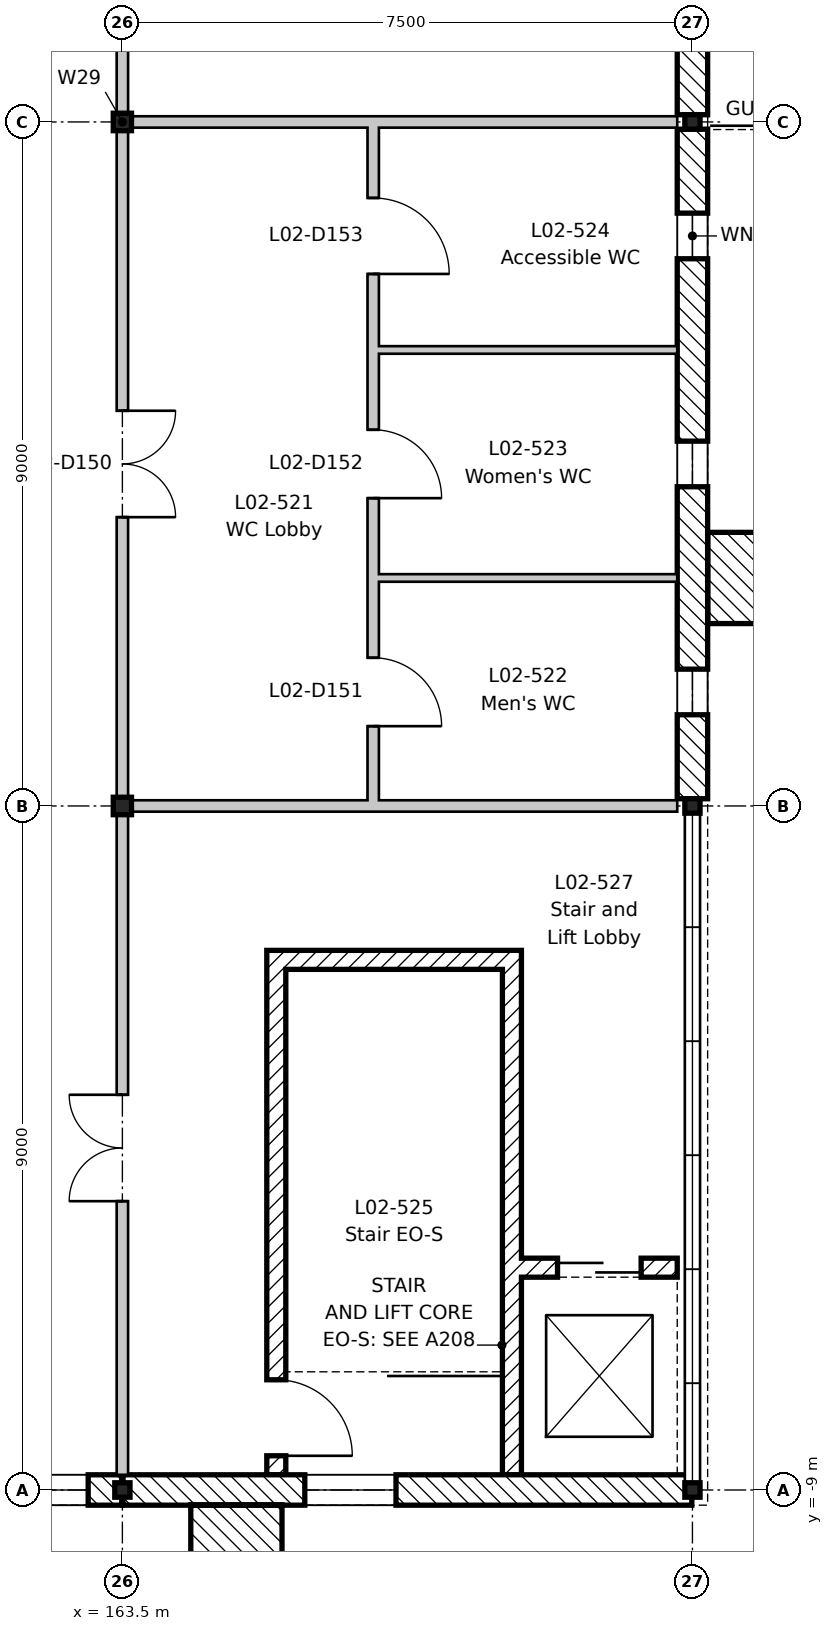
"""IFC4 building model, lengths in metres.
Left out: names, types, materials, properties, quantities, classifications, styles, units other than length and angle.
Written with IfcOpenShell. Run it as: python <this file> out.ifc"""

import sys

from ifc_helpers import new_model, si_unit, direction, frame, frame_2d, origin, origin_2d, place, context, subcontext, project, spatial, rectangle, i_section, extrude, element, fill, save


model = new_model("IFC4")
c1 = context("Model", 3, precision=1e-05, world=origin(), true_north=direction((0.0, 1.0)))
c2 = subcontext(c1, "Body", "Model", "MODEL_VIEW")
j1 = project(units=[si_unit("LENGTHUNIT", "METRE"), si_unit("PLANEANGLEUNIT", "RADIAN")], contexts=[c1])
p1 = place(None, origin())
s1 = spatial("IfcSite", under=j1, at=p1, CompositionType="ELEMENT")
p2 = place(p1, origin())
s2 = spatial("IfcBuilding", under=s1, at=p2, CompositionType="ELEMENT")
p3 = place(p2, frame((0.0, 0.0, 9.9)))
s3 = spatial("IfcBuildingStorey", under=s2, at=p3, CompositionType="ELEMENT", Elevation=9.9)
p4 = place(p3, frame((163.5, -9.0, -0.2), z_axis=(0.0, 0.0, 1.0), x_axis=(1.0, 0.0, 0.0)))
e1 = element("IfcColumn", 1, at=p4, inside=s3, PredefinedType="COLUMN", context=c2, shape_type="SweptSolid", body=[
    extrude(i_section(OverallWidth=0.2, OverallDepth=0.19, WebThickness=0.007, FlangeThickness=0.01, FilletRadius=0.018, at=origin_2d()), origin(), (0.0, 0.0, 1.0), 4.45),
])
for number, where, z_axis, x_axis in (
    (2, (163.5, 0.0, -0.2), (0.0, 0.0, 1.0), (1.0, 0.0, 0.0)),
    (3, (163.5, 9.0, -0.2), (0.0, 0.0, 1.0), (1.0, 0.0, 0.0)),
):
    element("IfcColumn", number, at=place(p3, frame(where, z_axis=z_axis, x_axis=x_axis)), inside=s3, PredefinedType="COLUMN", context=c2, shape_type="SweptSolid", body=[
        extrude(i_section(OverallWidth=0.24, OverallDepth=0.23, WebThickness=0.008, FlangeThickness=0.012, FilletRadius=0.021, at=origin_2d()), origin(), (0.0, 0.0, 1.0), 4.45),
    ])
for number, where, z_axis, x_axis in (
    (4, (171.0, -9.0, -0.2), (0.0, 0.0, 1.0), (1.0, 0.0, 0.0)),
    (5, (171.0, 0.0, -0.2), (0.0, 0.0, 1.0), (1.0, 0.0, 0.0)),
    (6, (171.0, 9.0, -0.2), (0.0, 0.0, 1.0), (1.0, 0.0, 0.0)),
):
    element("IfcColumn", number, at=place(p3, frame(where, z_axis=z_axis, x_axis=x_axis)), inside=s3, PredefinedType="COLUMN", context=c2, shape_type="SweptSolid", body=[
        extrude(i_section(OverallWidth=0.2, OverallDepth=0.19, WebThickness=0.007, FlangeThickness=0.01, FilletRadius=0.018, at=origin_2d()), origin(), (0.0, 0.0, 1.0), 4.45),
    ])
p5 = place(p3, frame((168.625, -8.8, 0.0), z_axis=(0.0, 0.0, 1.0), x_axis=(0.0, 1.0, 0.0)))
e7 = element("IfcWall", 7, at=p5, inside=s3, PredefinedType="SHEAR", context=c2, shape_type="SweptSolid", body=[
    extrude(rectangle(XDim=6.9, YDim=0.25, at=frame_2d((3.45, 0.0))), origin(), (0.0, 0.0, 1.0), 4.25),
])
p6 = place(p3, frame((165.525, -8.8, 0.0), z_axis=(0.0, 0.0, 1.0), x_axis=(0.0, 1.0, 0.0)))
e8 = element("IfcWall", 8, at=p6, inside=s3, PredefinedType="SHEAR", context=c2, shape_type="SweptSolid", body=[
    extrude(rectangle(XDim=6.9, YDim=0.25, at=frame_2d((3.45, 0.0))), origin(), (0.0, 0.0, 1.0), 4.25),
])
p7 = place(p6, frame((0.25, 0.0, 0.0)))
e9 = element("IfcOpeningElement", 9, at=p7, cuts=e8, PredefinedType="OPENING", context=c2, shape_type="SweptSolid", body=[
    extrude(rectangle(XDim=1.0, YDim=2.1, at=frame_2d((0.5, 1.05))), frame((0.0, 0.135, 0.0), z_axis=(0.0, -1.0, 0.0), x_axis=(1.0, 0.0, 0.0)), (0.0, 0.0, 1.0), 0.27),
])
p8 = place(p3, frame((165.65, -2.025, 0.0), z_axis=(0.0, 0.0, 1.0), x_axis=(1.0, 0.0, 0.0)))
e10 = element("IfcWall", 10, at=p8, inside=s3, PredefinedType="SHEAR", context=c2, shape_type="SweptSolid", body=[
    extrude(rectangle(XDim=2.85, YDim=0.25, at=frame_2d((1.425, 0.0))), origin(), (0.0, 0.0, 1.0), 4.25),
])
p9 = place(p3, frame((168.75, -6.075, 0.0), z_axis=(0.0, 0.0, 1.0), x_axis=(1.0, 0.0, 0.0)))
e11 = element("IfcWall", 11, at=p9, inside=s3, PredefinedType="SHEAR", context=c2, shape_type="SweptSolid", body=[
    extrude(rectangle(XDim=2.05, YDim=0.25, at=frame_2d((1.025, 0.0))), origin(), (0.0, 0.0, 1.0), 4.25),
])
p10 = place(p9, frame((0.475, 0.0, 0.0)))
e12 = element("IfcOpeningElement", 12, at=p10, cuts=e11, PredefinedType="OPENING", context=c2, shape_type="SweptSolid", body=[
    extrude(rectangle(XDim=1.1, YDim=2.1, at=frame_2d((0.55, 1.05))), frame((0.0, 0.135, 0.0), z_axis=(0.0, -1.0, 0.0), x_axis=(1.0, 0.0, 0.0)), (0.0, 0.0, 1.0), 0.27),
])
p11 = place(p3, frame((171.0, 8.905, 0.0), z_axis=(0.0, 0.0, 1.0), x_axis=(0.0, -1.0, 0.0)))
e13 = element("IfcWall", 13, at=p11, inside=s3, PredefinedType="STANDARD", context=c2, shape_type="SweptSolid", body=[
    extrude(rectangle(XDim=8.81, YDim=0.4, at=frame_2d((4.405, 0.0))), origin(), (0.0, 0.0, 1.0), 3.85),
])
p12 = place(p11, frame((7.105, 0.0, 1.5)))
e14 = element("IfcOpeningElement", 14, at=p12, cuts=e13, PredefinedType="OPENING", context=c2, shape_type="SweptSolid", body=[
    extrude(rectangle(XDim=0.6, YDim=1.2, at=frame_2d((0.3, 0.6))), frame((0.0, 0.21, 0.0), z_axis=(0.0, -1.0, 0.0), x_axis=(1.0, 0.0, 0.0)), (0.0, 0.0, 1.0), 0.42),
])
p13 = place(p11, frame((4.105, 0.0, 1.5)))
e15 = element("IfcOpeningElement", 15, at=p13, cuts=e13, PredefinedType="OPENING", context=c2, shape_type="SweptSolid", body=[
    extrude(rectangle(XDim=0.6, YDim=1.2, at=frame_2d((0.3, 0.6))), frame((0.0, 0.21, 0.0), z_axis=(0.0, -1.0, 0.0), x_axis=(1.0, 0.0, 0.0)), (0.0, 0.0, 1.0), 0.42),
])
p14 = place(p11, frame((1.105, 0.0, 1.5)))
e16 = element("IfcOpeningElement", 16, at=p14, cuts=e13, PredefinedType="OPENING", context=c2, shape_type="SweptSolid", body=[
    extrude(rectangle(XDim=0.6, YDim=1.2, at=frame_2d((0.3, 0.6))), frame((0.0, 0.21, 0.0), z_axis=(0.0, -1.0, 0.0), x_axis=(1.0, 0.0, 0.0)), (0.0, 0.0, 1.0), 0.42),
])
p15 = place(p3, frame((171.0, 17.905, 0.0), z_axis=(0.0, 0.0, 1.0), x_axis=(0.0, -1.0, 0.0)))
e17 = element("IfcWall", 17, at=p15, inside=s3, PredefinedType="STANDARD", context=c2, shape_type="SweptSolid", body=[
    extrude(rectangle(XDim=8.81, YDim=0.4, at=frame_2d((4.405, 0.0))), origin(), (0.0, 0.0, 1.0), 3.85),
])
p16 = place(p15, frame((7.03, 0.0, 1.5)))
e18 = element("IfcOpeningElement", 18, at=p16, cuts=e17, PredefinedType="OPENING", context=c2, shape_type="SweptSolid", body=[
    extrude(rectangle(XDim=0.75, YDim=1.2, at=frame_2d((0.375, 0.6))), frame((0.0, 0.21, 0.0), z_axis=(0.0, -1.0, 0.0), x_axis=(1.0, 0.0, 0.0)), (0.0, 0.0, 1.0), 0.42),
])
p17 = place(p15, frame((4.03, 0.0, 1.5)))
e19 = element("IfcOpeningElement", 19, at=p17, cuts=e17, PredefinedType="OPENING", context=c2, shape_type="SweptSolid", body=[
    extrude(rectangle(XDim=0.75, YDim=1.2, at=frame_2d((0.375, 0.6))), frame((0.0, 0.21, 0.0), z_axis=(0.0, -1.0, 0.0), x_axis=(1.0, 0.0, 0.0)), (0.0, 0.0, 1.0), 0.42),
])
p18 = place(p15, frame((1.03, 0.0, 1.5)))
e20 = element("IfcOpeningElement", 20, at=p18, cuts=e17, PredefinedType="OPENING", context=c2, shape_type="SweptSolid", body=[
    extrude(rectangle(XDim=0.75, YDim=1.2, at=frame_2d((0.375, 0.6))), frame((0.0, 0.21, 0.0), z_axis=(0.0, -1.0, 0.0), x_axis=(1.0, 0.0, 0.0)), (0.0, 0.0, 1.0), 0.42),
])
p19 = place(p3, frame((163.492, -9.0, 0.0), z_axis=(0.0, 0.0, 1.0), x_axis=(-1.0, 0.0, 0.0)))
e21 = element("IfcWall", 21, at=p19, inside=s3, PredefinedType="STANDARD", context=c2, shape_type="SweptSolid", body=[
    extrude(rectangle(XDim=2.983, YDim=0.4, at=frame_2d((1.492, 0.0))), origin(), (0.0, 0.0, 1.0), 4.05),
])
p20 = place(p19, frame((0.442, 0.0, 0.9)))
e22 = element("IfcOpeningElement", 22, at=p20, cuts=e21, PredefinedType="OPENING", context=c2, shape_type="SweptSolid", body=[
    extrude(rectangle(XDim=2.1, YDim=2.1, at=frame_2d((1.05, 1.05))), frame((0.0, 0.21, 0.0), z_axis=(0.0, -1.0, 0.0), x_axis=(1.0, 0.0, 0.0)), (0.0, 0.0, 1.0), 0.42),
])
p21 = place(p3, frame((170.992, -9.0, 0.0), z_axis=(0.0, 0.0, 1.0), x_axis=(-1.0, 0.0, 0.0)))
e23 = element("IfcWall", 23, at=p21, inside=s3, PredefinedType="STANDARD", context=c2, shape_type="SweptSolid", body=[
    extrude(rectangle(XDim=7.483, YDim=0.4, at=frame_2d((3.742, 0.0))), origin(), (0.0, 0.0, 1.0), 3.92),
])
p22 = place(p21, frame((3.892, 0.0, 0.9)))
e24 = element("IfcOpeningElement", 24, at=p22, cuts=e23, PredefinedType="OPENING", context=c2, shape_type="SweptSolid", body=[
    extrude(rectangle(XDim=1.2, YDim=2.7, at=frame_2d((0.6, 1.35))), frame((0.0, 0.21, 0.0), z_axis=(0.0, -1.0, 0.0), x_axis=(1.0, 0.0, 0.0)), (0.0, 0.0, 1.0), 0.42),
])
for number, where, z_axis, x_axis in (
    (25, (171.8, 2.4, 0.0), (0.0, 0.0, 1.0), (0.0, 1.0, 0.0)),
    (26, (164.4, -9.8, 0.0), (0.0, 0.0, 1.0), (1.0, 0.0, 0.0)),
):
    element("IfcWall", number, at=place(p3, frame(where, z_axis=z_axis, x_axis=x_axis)), inside=s3, PredefinedType="STANDARD", context=c2, shape_type="SweptSolid", body=[
        extrude(rectangle(XDim=1.2, YDim=1.2, at=frame_2d((0.6, 0.0))), origin(), (0.0, 0.0, 1.0), 3.65),
    ])
for number, where, z_axis, x_axis in (
    (27, (163.575, 9.0, 0.0), (0.0, 0.0, 1.0), (1.0, 0.0, 0.0)),
    (28, (163.575, 0.0, 0.0), (0.0, 0.0, 1.0), (1.0, 0.0, 0.0)),
):
    element("IfcWall", number, at=place(p3, frame(where, z_axis=z_axis, x_axis=x_axis)), inside=s3, PredefinedType="PARTITIONING", context=c2, shape_type="SweptSolid", body=[
        extrude(rectangle(XDim=7.225, YDim=0.15, at=frame_2d((3.613, 0.0))), origin(), (0.0, 0.0, 1.0), 3.9),
    ])
p23 = place(p3, frame((163.5, -8.8, 0.0), z_axis=(0.0, 0.0, 1.0), x_axis=(0.0, 1.0, 0.0)))
e29 = element("IfcWall", 29, at=p23, inside=s3, PredefinedType="PARTITIONING", context=c2, shape_type="SweptSolid", body=[
    extrude(rectangle(XDim=62.6, YDim=0.15, at=frame_2d((31.3, 0.0))), origin(), (0.0, 0.0, 1.0), 3.73),
])
p24 = place(p23, frame((21.6, 0.0, 0.0)))
e30 = element("IfcOpeningElement", 30, at=p24, cuts=e29, PredefinedType="OPENING", context=c2, shape_type="SweptSolid", body=[
    extrude(rectangle(XDim=1.4, YDim=2.1, at=frame_2d((0.7, 1.05))), frame((0.0, 0.085, 0.0), z_axis=(0.0, -1.0, 0.0), x_axis=(1.0, 0.0, 0.0)), (0.0, 0.0, 1.0), 0.17),
])
p25 = place(p23, frame((29.3, 0.0, 0.0)))
e31 = element("IfcOpeningElement", 31, at=p25, cuts=e29, PredefinedType="OPENING", context=c2, shape_type="SweptSolid", body=[
    extrude(rectangle(XDim=1.0, YDim=2.1, at=frame_2d((0.5, 1.05))), frame((0.0, 0.085, 0.0), z_axis=(0.0, -1.0, 0.0), x_axis=(1.0, 0.0, 0.0)), (0.0, 0.0, 1.0), 0.17),
])
p26 = place(p23, frame((33.8, 0.0, 0.0)))
e32 = element("IfcOpeningElement", 32, at=p26, cuts=e29, PredefinedType="OPENING", context=c2, shape_type="SweptSolid", body=[
    extrude(rectangle(XDim=1.0, YDim=2.1, at=frame_2d((0.5, 1.05))), frame((0.0, 0.085, 0.0), z_axis=(0.0, -1.0, 0.0), x_axis=(1.0, 0.0, 0.0)), (0.0, 0.0, 1.0), 0.17),
])
p27 = place(p23, frame((47.3, 0.0, 0.0)))
e33 = element("IfcOpeningElement", 33, at=p27, cuts=e29, PredefinedType="OPENING", context=c2, shape_type="SweptSolid", body=[
    extrude(rectangle(XDim=1.0, YDim=2.1, at=frame_2d((0.5, 1.05))), frame((0.0, 0.085, 0.0), z_axis=(0.0, -1.0, 0.0), x_axis=(1.0, 0.0, 0.0)), (0.0, 0.0, 1.0), 0.17),
])
p28 = place(p23, frame((51.8, 0.0, 0.0)))
e34 = element("IfcOpeningElement", 34, at=p28, cuts=e29, PredefinedType="OPENING", context=c2, shape_type="SweptSolid", body=[
    extrude(rectangle(XDim=1.0, YDim=2.1, at=frame_2d((0.5, 1.05))), frame((0.0, 0.085, 0.0), z_axis=(0.0, -1.0, 0.0), x_axis=(1.0, 0.0, 0.0)), (0.0, 0.0, 1.0), 0.17),
])
p29 = place(p23, frame((12.6, 0.0, 0.0)))
e35 = element("IfcOpeningElement", 35, at=p29, cuts=e29, PredefinedType="OPENING", context=c2, shape_type="SweptSolid", body=[
    extrude(rectangle(XDim=1.4, YDim=2.1, at=frame_2d((0.7, 1.05))), frame((0.0, 0.085, 0.0), z_axis=(0.0, -1.0, 0.0), x_axis=(1.0, 0.0, 0.0)), (0.0, 0.0, 1.0), 0.17),
])
p30 = place(p23, frame((3.6, 0.0, 0.0)))
e36 = element("IfcOpeningElement", 36, at=p30, cuts=e29, PredefinedType="OPENING", context=c2, shape_type="SweptSolid", body=[
    extrude(rectangle(XDim=1.4, YDim=2.1, at=frame_2d((0.7, 1.05))), frame((0.0, 0.085, 0.0), z_axis=(0.0, -1.0, 0.0), x_axis=(1.0, 0.0, 0.0)), (0.0, 0.0, 1.0), 0.17),
])
p31 = place(p23, frame((57.6, 0.0, 0.0)))
e37 = element("IfcOpeningElement", 37, at=p31, cuts=e29, PredefinedType="OPENING", context=c2, shape_type="SweptSolid", body=[
    extrude(rectangle(XDim=1.4, YDim=2.1, at=frame_2d((0.7, 1.05))), frame((0.0, 0.085, 0.0), z_axis=(0.0, -1.0, 0.0), x_axis=(1.0, 0.0, 0.0)), (0.0, 0.0, 1.0), 0.17),
])
p32 = place(p23, frame((36.75, 0.0, 0.0)))
e38 = element("IfcOpeningElement", 38, at=p32, cuts=e29, PredefinedType="OPENING", context=c2, shape_type="SweptSolid", body=[
    extrude(rectangle(XDim=1.0, YDim=2.1, at=frame_2d((0.5, 1.05))), frame((0.0, 0.085, 0.0), z_axis=(0.0, -1.0, 0.0), x_axis=(1.0, 0.0, 0.0)), (0.0, 0.0, 1.0), 0.17),
])
p33 = place(p23, frame((42.65, 0.0, 0.0)))
e39 = element("IfcOpeningElement", 39, at=p33, cuts=e29, PredefinedType="OPENING", context=c2, shape_type="SweptSolid", body=[
    extrude(rectangle(XDim=1.4, YDim=2.1, at=frame_2d((0.7, 1.05))), frame((0.0, 0.085, 0.0), z_axis=(0.0, -1.0, 0.0), x_axis=(1.0, 0.0, 0.0)), (0.0, 0.0, 1.0), 0.17),
])
p34 = place(p3, frame((166.8, 0.075, 0.0), z_axis=(0.0, 0.0, 1.0), x_axis=(0.0, 1.0, 0.0)))
e40 = element("IfcWall", 40, at=p34, inside=s3, PredefinedType="PARTITIONING", context=c2, shape_type="SweptSolid", body=[
    extrude(rectangle(XDim=8.85, YDim=0.15, at=frame_2d((4.425, 0.0))), origin(), (0.0, 0.0, 1.0), 4.25),
])
p35 = place(p34, frame((0.975, 0.0, 0.0)))
e41 = element("IfcOpeningElement", 41, at=p35, cuts=e40, PredefinedType="OPENING", context=c2, shape_type="SweptSolid", body=[
    extrude(rectangle(XDim=0.9, YDim=2.1, at=frame_2d((0.45, 1.05))), frame((0.0, 0.085, 0.0), z_axis=(0.0, -1.0, 0.0), x_axis=(1.0, 0.0, 0.0)), (0.0, 0.0, 1.0), 0.17),
])
p36 = place(p34, frame((3.975, 0.0, 0.0)))
e42 = element("IfcOpeningElement", 42, at=p36, cuts=e40, PredefinedType="OPENING", context=c2, shape_type="SweptSolid", body=[
    extrude(rectangle(XDim=0.9, YDim=2.1, at=frame_2d((0.45, 1.05))), frame((0.0, 0.085, 0.0), z_axis=(0.0, -1.0, 0.0), x_axis=(1.0, 0.0, 0.0)), (0.0, 0.0, 1.0), 0.17),
])
p37 = place(p34, frame((6.925, 0.0, 0.0)))
e43 = element("IfcOpeningElement", 43, at=p37, cuts=e40, PredefinedType="OPENING", context=c2, shape_type="SweptSolid", body=[
    extrude(rectangle(XDim=1.0, YDim=2.1, at=frame_2d((0.5, 1.05))), frame((0.0, 0.085, 0.0), z_axis=(0.0, -1.0, 0.0), x_axis=(1.0, 0.0, 0.0)), (0.0, 0.0, 1.0), 0.17),
])
for number, where, z_axis, x_axis in (
    (44, (166.875, 3.0, 0.0), (0.0, 0.0, 1.0), (1.0, 0.0, 0.0)),
    (45, (166.875, 6.0, 0.0), (0.0, 0.0, 1.0), (1.0, 0.0, 0.0)),
):
    element("IfcWall", number, at=place(p3, frame(where, z_axis=z_axis, x_axis=x_axis)), inside=s3, PredefinedType="PARTITIONING", context=c2, shape_type="SweptSolid", body=[
        extrude(rectangle(XDim=3.925, YDim=0.1, at=frame_2d((1.962, 0.0))), origin(), (0.0, 0.0, 1.0), 4.25),
    ])
p38 = place(p12, origin())
e46 = element("IfcWindow", 46, at=p38, inside=s3, PartitioningType="SINGLE_PANEL", PredefinedType="WINDOW", context=c2, shape_type="SweptSolid", body=[
    extrude(rectangle(XDim=0.6, YDim=1.2, at=frame_2d((0.3, 0.6))), frame((0.0, -0.12, 0.0), z_axis=(0.0, -1.0, 0.0), x_axis=(1.0, 0.0, 0.0)), (0.0, 0.0, 1.0), 0.06),
])
fill(e14, e46)
p39 = place(p13, origin())
e47 = element("IfcWindow", 47, at=p39, inside=s3, PartitioningType="SINGLE_PANEL", PredefinedType="WINDOW", context=c2, shape_type="SweptSolid", body=[
    extrude(rectangle(XDim=0.6, YDim=1.2, at=frame_2d((0.3, 0.6))), frame((0.0, -0.12, 0.0), z_axis=(0.0, -1.0, 0.0), x_axis=(1.0, 0.0, 0.0)), (0.0, 0.0, 1.0), 0.06),
])
fill(e15, e47)
p40 = place(p14, origin())
e48 = element("IfcWindow", 48, at=p40, inside=s3, PartitioningType="SINGLE_PANEL", PredefinedType="WINDOW", context=c2, shape_type="SweptSolid", body=[
    extrude(rectangle(XDim=0.6, YDim=1.2, at=frame_2d((0.3, 0.6))), frame((0.0, -0.12, 0.0), z_axis=(0.0, -1.0, 0.0), x_axis=(1.0, 0.0, 0.0)), (0.0, 0.0, 1.0), 0.06),
])
fill(e16, e48)
p41 = place(p20, origin())
e49 = element("IfcWindow", 49, at=p41, inside=s3, PartitioningType="SINGLE_PANEL", PredefinedType="WINDOW", context=c2, shape_type="SweptSolid", body=[
    extrude(rectangle(XDim=2.1, YDim=2.1, at=frame_2d((1.05, 1.05))), frame((0.0, -0.12, 0.0), z_axis=(0.0, -1.0, 0.0), x_axis=(1.0, 0.0, 0.0)), (0.0, 0.0, 1.0), 0.06),
])
fill(e22, e49)
p42 = place(p22, origin())
e50 = element("IfcWindow", 50, at=p42, inside=s3, PartitioningType="SINGLE_PANEL", PredefinedType="WINDOW", context=c2, shape_type="SweptSolid", body=[
    extrude(rectangle(XDim=1.2, YDim=2.7, at=frame_2d((0.6, 1.35))), frame((0.0, -0.12, 0.0), z_axis=(0.0, -1.0, 0.0), x_axis=(1.0, 0.0, 0.0)), (0.0, 0.0, 1.0), 0.06),
])
fill(e24, e50)
p43 = place(p29, frame((1.4, 0.0, 0.0), z_axis=(0.0, 0.0, 1.0), x_axis=(-1.0, 0.0, 0.0)))
e51 = element("IfcDoor", 51, at=p43, inside=s3, OperationType="DOUBLE_DOOR_SINGLE_SWING", PredefinedType="DOOR", context=c2, shape_type="SweptSolid", body=[
    extrude(rectangle(XDim=1.4, YDim=2.1, at=frame_2d((0.7, 1.05))), frame((0.0, 0.025, 0.0), z_axis=(0.0, -1.0, 0.0), x_axis=(1.0, 0.0, 0.0)), (0.0, 0.0, 1.0), 0.05),
])
fill(e35, e51)
p44 = place(p35, frame((0.9, 0.0, 0.0), z_axis=(0.0, 0.0, 1.0), x_axis=(-1.0, 0.0, 0.0)))
e52 = element("IfcDoor", 52, at=p44, inside=s3, OperationType="SINGLE_SWING_RIGHT", PredefinedType="DOOR", context=c2, shape_type="SweptSolid", body=[
    extrude(rectangle(XDim=0.9, YDim=2.1, at=frame_2d((0.45, 1.05))), frame((0.0, 0.025, 0.0), z_axis=(0.0, -1.0, 0.0), x_axis=(1.0, 0.0, 0.0)), (0.0, 0.0, 1.0), 0.05),
])
fill(e41, e52)
p45 = place(p36, frame((0.9, 0.0, 0.0), z_axis=(0.0, 0.0, 1.0), x_axis=(-1.0, 0.0, 0.0)))
e53 = element("IfcDoor", 53, at=p45, inside=s3, OperationType="SINGLE_SWING_RIGHT", PredefinedType="DOOR", context=c2, shape_type="SweptSolid", body=[
    extrude(rectangle(XDim=0.9, YDim=2.1, at=frame_2d((0.45, 1.05))), frame((0.0, 0.025, 0.0), z_axis=(0.0, -1.0, 0.0), x_axis=(1.0, 0.0, 0.0)), (0.0, 0.0, 1.0), 0.05),
])
fill(e42, e53)
p46 = place(p37, frame((1.0, 0.0, 0.0), z_axis=(0.0, 0.0, 1.0), x_axis=(-1.0, 0.0, 0.0)))
e54 = element("IfcDoor", 54, at=p46, inside=s3, OperationType="SINGLE_SWING_RIGHT", PredefinedType="DOOR", context=c2, shape_type="SweptSolid", body=[
    extrude(rectangle(XDim=1.0, YDim=2.1, at=frame_2d((0.5, 1.05))), frame((0.0, 0.025, 0.0), z_axis=(0.0, -1.0, 0.0), x_axis=(1.0, 0.0, 0.0)), (0.0, 0.0, 1.0), 0.05),
])
fill(e43, e54)
p47 = place(p7, frame((1.0, 0.0, 0.0), z_axis=(0.0, 0.0, 1.0), x_axis=(-1.0, 0.0, 0.0)))
e55 = element("IfcDoor", 55, at=p47, inside=s3, OperationType="SINGLE_SWING_RIGHT", PredefinedType="DOOR", context=c2, shape_type="SweptSolid", body=[
    extrude(rectangle(XDim=1.0, YDim=2.1, at=frame_2d((0.5, 1.05))), frame((0.0, 0.025, 0.0), z_axis=(0.0, -1.0, 0.0), x_axis=(1.0, 0.0, 0.0)), (0.0, 0.0, 1.0), 0.05),
])
fill(e9, e55)
p48 = place(p30, origin())
e56 = element("IfcDoor", 56, at=p48, inside=s3, OperationType="DOUBLE_DOOR_SINGLE_SWING", PredefinedType="DOOR", context=c2, shape_type="SweptSolid", body=[
    extrude(rectangle(XDim=1.4, YDim=2.1, at=frame_2d((0.7, 1.05))), frame((0.0, 0.025, 0.0), z_axis=(0.0, -1.0, 0.0), x_axis=(1.0, 0.0, 0.0)), (0.0, 0.0, 1.0), 0.05),
])
fill(e36, e56)
p49 = place(p10, origin())
e57 = element("IfcDoor", 57, at=p49, inside=s3, OperationType="SLIDING_TO_LEFT", PredefinedType="DOOR", context=c2, shape_type="SweptSolid", body=[
    extrude(rectangle(XDim=1.1, YDim=2.1, at=frame_2d((0.55, 1.05))), frame((0.0, 0.025, 0.0), z_axis=(0.0, -1.0, 0.0), x_axis=(1.0, 0.0, 0.0)), (0.0, 0.0, 1.0), 0.05),
])
fill(e12, e57)
save(model, sys.argv[1])
